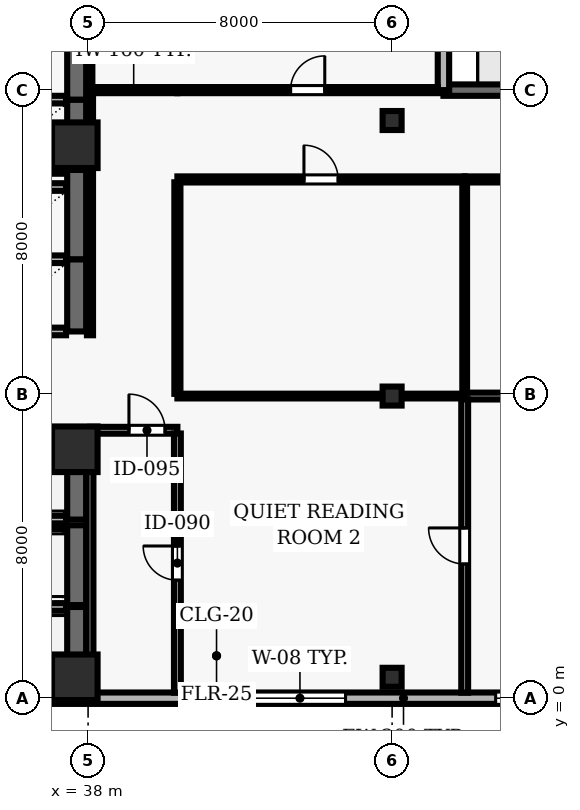
"""IFC4 building model, lengths in metres.
Left out: names, types, materials, properties, quantities, classifications, styles, units other than length and angle.
Written with IfcOpenShell. Run it as: python <this file> out.ifc"""

import sys

from ifc_helpers import new_model, si_unit, direction, frame, frame_2d, origin, origin_2d, place, context, subcontext, project, spatial, rectangle, hollow_rectangle, extrude, element, fill, save


model = new_model("IFC4")
c1 = context("Model", 3, precision=1e-05, world=origin(), true_north=direction((0.0, 1.0)))
c2 = subcontext(c1, "Body", "Model", "MODEL_VIEW")
j1 = project(units=[si_unit("LENGTHUNIT", "METRE"), si_unit("PLANEANGLEUNIT", "RADIAN")], contexts=[c1])
p1 = place(None, origin())
s1 = spatial("IfcSite", under=j1, at=p1, CompositionType="ELEMENT")
p2 = place(p1, origin())
s2 = spatial("IfcBuilding", under=s1, at=p2, CompositionType="ELEMENT")
p3 = place(p2, frame((0.0, 0.0, 130.7)))
s3 = spatial("IfcBuildingStorey", under=s2, at=p3, CompositionType="ELEMENT", Elevation=130.7)
for number, where, z_axis, x_axis in (
    (1, (37.65, 0.55, 0.0), (0.0, 0.0, 1.0), (1.0, 0.0, 0.0)),
    (2, (37.65, 6.55, 0.0), (0.0, 0.0, 1.0), (1.0, 0.0, 0.0)),
    (3, (37.65, 14.55, 0.0), (0.0, 0.0, 1.0), (1.0, 0.0, 0.0)),
):
    element("IfcColumn", number, at=place(p3, frame(where, z_axis=z_axis, x_axis=x_axis)), inside=s3, PredefinedType="COLUMN", context=c2, shape_type="SweptSolid", body=[
        extrude(rectangle(XDim=1.2, YDim=1.2, at=origin_2d()), origin(), (0.0, 0.0, 1.0), 3.9),
    ])
for number, where, z_axis, x_axis in (
    (4, (46.0, 0.55, 0.0), (0.0, 0.0, 1.0), (1.0, 0.0, 0.0)),
    (5, (46.0, 7.95, 0.0), (0.0, 0.0, 1.0), (1.0, 0.0, 0.0)),
    (6, (46.0, 15.2, 0.0), (0.0, 0.0, 1.0), (1.0, 0.0, 0.0)),
):
    element("IfcColumn", number, at=place(p3, frame(where, z_axis=z_axis, x_axis=x_axis)), inside=s3, PredefinedType="COLUMN", context=c2, shape_type="SweptSolid", body=[
        extrude(hollow_rectangle(XDim=0.5, YDim=0.5, WallThickness=0.025, at=origin_2d()), origin(), (0.0, 0.0, 1.0), 3.9),
    ])
p4 = place(p3, frame((24.5, 0.0, 0.0), z_axis=(0.0, 0.0, 1.0), x_axis=(1.0, 0.0, 0.0)))
e7 = element("IfcWall", 7, at=p4, inside=s3, PredefinedType="SOLIDWALL", context=c2, shape_type="SweptSolid", body=[
    extrude(rectangle(XDim=43.6, YDim=0.3, at=frame_2d((21.8, 0.0))), origin(), (0.0, 0.0, 1.0), 3.69),
])
p5 = place(p4, frame((1.525, 0.0, 0.9)))
e8 = element("IfcOpeningElement", 8, at=p5, cuts=e7, PredefinedType="OPENING", context=c2, shape_type="SweptSolid", body=[
    extrude(rectangle(XDim=2.4, YDim=1.8, at=frame_2d((1.2, 0.9))), frame((0.0, 0.16, 0.0), z_axis=(0.0, -1.0, 0.0), x_axis=(1.0, 0.0, 0.0)), (0.0, 0.0, 1.0), 0.32),
])
p6 = place(p4, frame((17.875, 0.0, 0.9)))
e9 = element("IfcOpeningElement", 9, at=p6, cuts=e7, PredefinedType="OPENING", context=c2, shape_type="SweptSolid", body=[
    extrude(rectangle(XDim=2.4, YDim=1.8, at=frame_2d((1.2, 0.9))), frame((0.0, 0.16, 0.0), z_axis=(0.0, -1.0, 0.0), x_axis=(1.0, 0.0, 0.0)), (0.0, 0.0, 1.0), 0.32),
])
p7 = place(p4, frame((24.225, 0.0, 0.9)))
e10 = element("IfcOpeningElement", 10, at=p7, cuts=e7, PredefinedType="OPENING", context=c2, shape_type="SweptSolid", body=[
    extrude(rectangle(XDim=2.4, YDim=1.8, at=frame_2d((1.2, 0.9))), frame((0.0, 0.16, 0.0), z_axis=(0.0, -1.0, 0.0), x_axis=(1.0, 0.0, 0.0)), (0.0, 0.0, 1.0), 0.32),
])
p8 = place(p4, frame((28.325, 0.0, 0.9)))
e11 = element("IfcOpeningElement", 11, at=p8, cuts=e7, PredefinedType="OPENING", context=c2, shape_type="SweptSolid", body=[
    extrude(rectangle(XDim=2.4, YDim=1.8, at=frame_2d((1.2, 0.9))), frame((0.0, 0.16, 0.0), z_axis=(0.0, -1.0, 0.0), x_axis=(1.0, 0.0, 0.0)), (0.0, 0.0, 1.0), 0.32),
])
p9 = place(p4, frame((34.225, 0.0, 0.9)))
e12 = element("IfcOpeningElement", 12, at=p9, cuts=e7, PredefinedType="OPENING", context=c2, shape_type="SweptSolid", body=[
    extrude(rectangle(XDim=2.4, YDim=1.8, at=frame_2d((1.2, 0.9))), frame((0.0, 0.16, 0.0), z_axis=(0.0, -1.0, 0.0), x_axis=(1.0, 0.0, 0.0)), (0.0, 0.0, 1.0), 0.32),
])
p10 = place(p4, frame((39.675, 0.0, 0.9)))
e13 = element("IfcOpeningElement", 13, at=p10, cuts=e7, PredefinedType="OPENING", context=c2, shape_type="SweptSolid", body=[
    extrude(rectangle(XDim=2.4, YDim=1.8, at=frame_2d((1.2, 0.9))), frame((0.0, 0.16, 0.0), z_axis=(0.0, -1.0, 0.0), x_axis=(1.0, 0.0, 0.0)), (0.0, 0.0, 1.0), 0.32),
])
p11 = place(p3, frame((68.1, 16.0, 0.0), z_axis=(0.0, 0.0, 1.0), x_axis=(-1.0, 0.0, 0.0)))
e14 = element("IfcWall", 14, at=p11, inside=s3, PredefinedType="SOLIDWALL", context=c2, shape_type="SweptSolid", body=[
    extrude(rectangle(XDim=20.749, YDim=0.3, at=frame_2d((10.375, 0.0))), origin(), (0.0, 0.0, 1.0), 3.69),
])
p12 = place(p11, frame((11.974, 0.0, 0.0)))
e15 = element("IfcOpeningElement", 15, at=p12, cuts=e14, PredefinedType="OPENING", context=c2, shape_type="SweptSolid", body=[
    extrude(rectangle(XDim=1.0, YDim=2.2, at=frame_2d((0.5, 1.1))), frame((0.0, 0.16, 0.0), z_axis=(0.0, -1.0, 0.0), x_axis=(1.0, 0.0, 0.0)), (0.0, 0.0, 1.0), 0.32),
])
p13 = place(p11, frame((1.958, 0.0, 0.9)))
e16 = element("IfcOpeningElement", 16, at=p13, cuts=e14, PredefinedType="OPENING", context=c2, shape_type="SweptSolid", body=[
    extrude(rectangle(XDim=3.0, YDim=2.2, at=frame_2d((1.5, 1.1))), frame((0.0, 0.16, 0.0), z_axis=(0.0, -1.0, 0.0), x_axis=(1.0, 0.0, 0.0)), (0.0, 0.0, 1.0), 0.32),
])
p14 = place(p11, frame((8.424, 0.0, 0.9)))
e17 = element("IfcOpeningElement", 17, at=p14, cuts=e14, PredefinedType="OPENING", context=c2, shape_type="SweptSolid", body=[
    extrude(rectangle(XDim=3.0, YDim=2.2, at=frame_2d((1.5, 1.1))), frame((0.0, 0.16, 0.0), z_axis=(0.0, -1.0, 0.0), x_axis=(1.0, 0.0, 0.0)), (0.0, 0.0, 1.0), 0.32),
])
p15 = place(p11, frame((15.791, 0.0, 0.9)))
e18 = element("IfcOpeningElement", 18, at=p15, cuts=e14, PredefinedType="OPENING", context=c2, shape_type="SweptSolid", body=[
    extrude(rectangle(XDim=3.0, YDim=2.2, at=frame_2d((1.5, 1.1))), frame((0.0, 0.16, 0.0), z_axis=(0.0, -1.0, 0.0), x_axis=(1.0, 0.0, 0.0)), (0.0, 0.0, 1.0), 0.32),
])
p16 = place(p3, frame((47.351, 16.0, 0.0), z_axis=(0.0, 0.0, 1.0), x_axis=(0.0, 1.0, 0.0)))
e19 = element("IfcWall", 19, at=p16, inside=s3, PredefinedType="SOLIDWALL", context=c2, shape_type="SweptSolid", body=[
    extrude(rectangle(XDim=10.7, YDim=0.3, at=frame_2d((5.35, 0.0))), origin(), (0.0, 0.0, 1.0), 3.69),
])
p17 = place(p16, frame((4.75, 0.0, 0.9)))
e20 = element("IfcOpeningElement", 20, at=p17, cuts=e19, PredefinedType="OPENING", context=c2, shape_type="SweptSolid", body=[
    extrude(rectangle(XDim=1.2, YDim=1.6, at=frame_2d((0.6, 0.8))), frame((0.0, 0.16, 0.0), z_axis=(0.0, -1.0, 0.0), x_axis=(1.0, 0.0, 0.0)), (0.0, 0.0, 1.0), 0.32),
])
p18 = place(p3, frame((37.7, 0.3, 0.0), z_axis=(0.0, 0.0, 1.0), x_axis=(0.0, 1.0, 0.0)))
e21 = element("IfcWall", 21, at=p18, inside=s3, PredefinedType="SHEAR", context=c2, shape_type="SweptSolid", body=[
    extrude(rectangle(XDim=2.1, YDim=0.5, at=frame_2d((1.05, 0.0))), origin(), (0.0, 0.0, 1.0), 3.69),
])
for number, where, z_axis, x_axis in (
    (22, (35.28, 0.3, 0.0), (0.0, 0.0, 1.0), (1.0, 0.0, 0.0)),
    (23, (37.42, 2.4, 0.0), (0.0, 0.0, 1.0), (-1.0, 0.0, 0.0)),
):
    element("IfcWall", number, at=place(p3, frame(where, z_axis=z_axis, x_axis=x_axis)), inside=s3, PredefinedType="SOLIDWALL", context=c2, shape_type="SweptSolid", body=[
        extrude(rectangle(XDim=2.14, YDim=0.2, at=frame_2d((1.07, 0.0))), origin(), (0.0, 0.0, 1.0), 3.69),
    ])
p19 = place(p3, frame((37.7, 2.45, 0.0), z_axis=(0.0, 0.0, 1.0), x_axis=(0.0, 1.0, 0.0)))
e24 = element("IfcWall", 24, at=p19, inside=s3, PredefinedType="SHEAR", context=c2, shape_type="SweptSolid", body=[
    extrude(rectangle(XDim=2.1, YDim=0.5, at=frame_2d((1.05, 0.0))), origin(), (0.0, 0.0, 1.0), 3.69),
])
p20 = place(p3, frame((37.42, 4.55, 0.0), z_axis=(0.0, 0.0, 1.0), x_axis=(-1.0, 0.0, 0.0)))
e25 = element("IfcWall", 25, at=p20, inside=s3, PredefinedType="SOLIDWALL", context=c2, shape_type="SweptSolid", body=[
    extrude(rectangle(XDim=2.14, YDim=0.2, at=frame_2d((1.07, 0.0))), origin(), (0.0, 0.0, 1.0), 3.69),
])
p21 = place(p3, frame((37.7, 4.7, 0.0), z_axis=(0.0, 0.0, 1.0), x_axis=(0.0, 1.0, 0.0)))
e26 = element("IfcWall", 26, at=p21, inside=s3, PredefinedType="SHEAR", context=c2, shape_type="SweptSolid", body=[
    extrude(rectangle(XDim=2.25, YDim=0.5, at=frame_2d((1.125, 0.0))), origin(), (0.0, 0.0, 1.0), 3.69),
])
for number, where, z_axis, x_axis in (
    (27, (35.28, 4.7, 0.0), (0.0, 0.0, 1.0), (1.0, 0.0, 0.0)),
    (28, (37.42, 6.95, 0.0), (0.0, 0.0, 1.0), (-1.0, 0.0, 0.0)),
):
    element("IfcWall", number, at=place(p3, frame(where, z_axis=z_axis, x_axis=x_axis)), inside=s3, PredefinedType="SOLIDWALL", context=c2, shape_type="SweptSolid", body=[
        extrude(rectangle(XDim=2.14, YDim=0.2, at=frame_2d((1.07, 0.0))), origin(), (0.0, 0.0, 1.0), 3.69),
    ])
p22 = place(p3, frame((37.7, 9.65, 0.0), z_axis=(0.0, 0.0, 1.0), x_axis=(0.0, 1.0, 0.0)))
e29 = element("IfcWall", 29, at=p22, inside=s3, PredefinedType="SHEAR", context=c2, shape_type="SweptSolid", body=[
    extrude(rectangle(XDim=1.9, YDim=0.5, at=frame_2d((0.95, 0.0))), origin(), (0.0, 0.0, 1.0), 3.69),
])
for number, where, z_axis, x_axis in (
    (30, (35.28, 9.65, 0.0), (0.0, 0.0, 1.0), (1.0, 0.0, 0.0)),
    (31, (37.42, 11.55, 0.0), (0.0, 0.0, 1.0), (-1.0, 0.0, 0.0)),
):
    element("IfcWall", number, at=place(p3, frame(where, z_axis=z_axis, x_axis=x_axis)), inside=s3, PredefinedType="SOLIDWALL", context=c2, shape_type="SweptSolid", body=[
        extrude(rectangle(XDim=2.14, YDim=0.2, at=frame_2d((1.07, 0.0))), origin(), (0.0, 0.0, 1.0), 3.69),
    ])
p23 = place(p3, frame((37.7, 11.55, 0.0), z_axis=(0.0, 0.0, 1.0), x_axis=(0.0, 1.0, 0.0)))
e32 = element("IfcWall", 32, at=p23, inside=s3, PredefinedType="SHEAR", context=c2, shape_type="SweptSolid", body=[
    extrude(rectangle(XDim=2.35, YDim=0.5, at=frame_2d((1.175, 0.0))), origin(), (0.0, 0.0, 1.0), 3.69),
])
p24 = place(p3, frame((37.42, 13.45, 0.0), z_axis=(0.0, 0.0, 1.0), x_axis=(-1.0, 0.0, 0.0)))
e33 = element("IfcWall", 33, at=p24, inside=s3, PredefinedType="SOLIDWALL", context=c2, shape_type="SweptSolid", body=[
    extrude(rectangle(XDim=2.14, YDim=0.2, at=frame_2d((1.07, 0.0))), origin(), (0.0, 0.0, 1.0), 3.69),
])
p25 = place(p3, frame((37.7, 13.9, 0.0), z_axis=(0.0, 0.0, 1.0), x_axis=(0.0, 1.0, 0.0)))
e34 = element("IfcWall", 34, at=p25, inside=s3, PredefinedType="SHEAR", context=c2, shape_type="SweptSolid", body=[
    extrude(rectangle(XDim=1.85, YDim=0.5, at=frame_2d((0.925, 0.0))), origin(), (0.0, 0.0, 1.0), 3.69),
])
for number, where, z_axis, x_axis in (
    (35, (35.28, 13.9, 0.0), (0.0, 0.0, 1.0), (1.0, 0.0, 0.0)),
    (36, (37.42, 15.75, 0.0), (0.0, 0.0, 1.0), (-1.0, 0.0, 0.0)),
):
    element("IfcWall", number, at=place(p3, frame(where, z_axis=z_axis, x_axis=x_axis)), inside=s3, PredefinedType="SOLIDWALL", context=c2, shape_type="SweptSolid", body=[
        extrude(rectangle(XDim=2.14, YDim=0.2, at=frame_2d((1.07, 0.0))), origin(), (0.0, 0.0, 1.0), 3.69),
    ])
p26 = place(p3, frame((37.7, 15.75, 0.0), z_axis=(0.0, 0.0, 1.0), x_axis=(0.0, 1.0, 0.0)))
e37 = element("IfcWall", 37, at=p26, inside=s3, PredefinedType="SHEAR", context=c2, shape_type="SweptSolid", body=[
    extrude(rectangle(XDim=1.85, YDim=0.5, at=frame_2d((0.925, 0.0))), origin(), (0.0, 0.0, 1.0), 3.69),
])
p27 = place(p3, frame((38.05, 7.05, 0.0), z_axis=(0.0, 0.0, 1.0), x_axis=(1.0, 0.0, 0.0)))
e38 = element("IfcWall", 38, at=p27, inside=s3, PredefinedType="PARTITIONING", context=c2, shape_type="SweptSolid", body=[
    extrude(rectangle(XDim=2.3, YDim=0.18, at=frame_2d((1.15, 0.0))), origin(), (0.0, 0.0, 1.0), 3.69),
])
p28 = place(p27, frame((1.025, 0.0, 0.0)))
e39 = element("IfcOpeningElement", 39, at=p28, cuts=e38, PredefinedType="OPENING", context=c2, shape_type="SweptSolid", body=[
    extrude(rectangle(XDim=0.95, YDim=2.1, at=frame_2d((0.475, 1.05))), frame((0.0, 0.1, 0.0), z_axis=(0.0, -1.0, 0.0), x_axis=(1.0, 0.0, 0.0)), (0.0, 0.0, 1.0), 0.2),
])
p29 = place(p3, frame((40.35, 13.65, 0.0), z_axis=(0.0, 0.0, 1.0), x_axis=(1.0, 0.0, 0.0)))
e40 = element("IfcWall", 40, at=p29, inside=s3, PredefinedType="PARTITIONING", context=c2, shape_type="SweptSolid", body=[
    extrude(rectangle(XDim=7.56, YDim=0.16, at=frame_2d((3.78, 0.0))), origin(), (0.0, 0.0, 1.0), 3.69),
])
p30 = place(p29, frame((3.33, 0.0, 0.0)))
e41 = element("IfcOpeningElement", 41, at=p30, cuts=e40, PredefinedType="OPENING", context=c2, shape_type="SweptSolid", body=[
    extrude(rectangle(XDim=0.9, YDim=2.1, at=frame_2d((0.45, 1.05))), frame((0.0, 0.09, 0.0), z_axis=(0.0, -1.0, 0.0), x_axis=(1.0, 0.0, 0.0)), (0.0, 0.0, 1.0), 0.18),
])
p31 = place(p3, frame((40.35, 16.0, 0.0), z_axis=(0.0, 0.0, 1.0), x_axis=(-1.0, 0.0, 0.0)))
e42 = element("IfcWall", 42, at=p31, inside=s3, PredefinedType="PARTITIONING", context=c2, shape_type="SweptSolid", body=[
    extrude(rectangle(XDim=2.3, YDim=0.16, at=frame_2d((1.15, 0.0))), origin(), (0.0, 0.0, 1.0), 3.69),
])
p32 = place(p3, frame((40.35, 16.0, 0.0), z_axis=(0.0, 0.0, 1.0), x_axis=(1.0, 0.0, 0.0)))
e43 = element("IfcWall", 43, at=p32, inside=s3, PredefinedType="PARTITIONING", context=c2, shape_type="SweptSolid", body=[
    extrude(rectangle(XDim=6.856, YDim=0.16, at=frame_2d((3.428, 0.0))), origin(), (0.0, 0.0, 1.0), 3.39),
])
p33 = place(p32, frame((2.978, 0.0, 0.0)))
e44 = element("IfcOpeningElement", 44, at=p33, cuts=e43, PredefinedType="OPENING", context=c2, shape_type="SweptSolid", body=[
    extrude(rectangle(XDim=0.9, YDim=2.1, at=frame_2d((0.45, 1.05))), frame((0.0, 0.09, 0.0), z_axis=(0.0, -1.0, 0.0), x_axis=(1.0, 0.0, 0.0)), (0.0, 0.0, 1.0), 0.18),
])
p34 = place(p3, frame((47.91, 7.95, 0.0), z_axis=(0.0, 0.0, 1.0), x_axis=(-1.0, 0.0, 0.0)))
e45 = element("IfcWall", 45, at=p34, inside=s3, PredefinedType="PARTITIONING", context=c2, shape_type="SweptSolid", body=[
    extrude(rectangle(XDim=7.56, YDim=0.125, at=frame_2d((3.78, 0.0))), origin(), (0.0, 0.0, 1.0), 3.073),
])
p35 = place(p3, frame((47.91, 13.65, 0.0), z_axis=(0.0, 0.0, 1.0), x_axis=(1.0, 0.0, 0.0)))
e46 = element("IfcWall", 46, at=p35, inside=s3, PredefinedType="PARTITIONING", context=c2, shape_type="SweptSolid", body=[
    extrude(rectangle(XDim=8.17, YDim=0.16, at=frame_2d((4.085, 0.0))), origin(), (0.0, 0.0, 1.0), 3.69),
])
p36 = place(p35, frame((5.035, 0.0, 0.0)))
e47 = element("IfcOpeningElement", 47, at=p36, cuts=e46, PredefinedType="OPENING", context=c2, shape_type="SweptSolid", body=[
    extrude(rectangle(XDim=0.9, YDim=2.1, at=frame_2d((0.45, 1.05))), frame((0.0, 0.09, 0.0), z_axis=(0.0, -1.0, 0.0), x_axis=(1.0, 0.0, 0.0)), (0.0, 0.0, 1.0), 0.18),
])
p37 = place(p3, frame((56.08, 7.95, 0.0), z_axis=(0.0, 0.0, 1.0), x_axis=(-1.0, 0.0, 0.0)))
e48 = element("IfcWall", 48, at=p37, inside=s3, PredefinedType="PARTITIONING", context=c2, shape_type="SweptSolid", body=[
    extrude(rectangle(XDim=8.17, YDim=0.18, at=frame_2d((4.085, 0.0))), origin(), (0.0, 0.0, 1.0), 3.073),
])
p38 = place(p3, frame((38.05, 6.965, 0.0), z_axis=(0.0, 0.0, 1.0), x_axis=(0.0, -1.0, 0.0)))
e49 = element("IfcWall", 49, at=p38, inside=s3, PredefinedType="PARTITIONING", context=c2, shape_type="SweptSolid", body=[
    extrude(rectangle(XDim=6.82, YDim=0.18, at=frame_2d((3.41, 0.0))), origin(), (0.0, 0.0, 1.0), 3.073),
])
p39 = place(p3, frame((38.05, 15.925, 0.0), z_axis=(0.0, 0.0, 1.0), x_axis=(0.0, -1.0, 0.0)))
e50 = element("IfcWall", 50, at=p39, inside=s3, PredefinedType="PARTITIONING", context=c2, shape_type="SweptSolid", body=[
    extrude(rectangle(XDim=6.375, YDim=0.16, at=frame_2d((3.188, 0.0))), origin(), (0.0, 0.0, 1.0), 3.073),
])
p40 = place(p3, frame((38.05, 23.85, 0.0), z_axis=(0.0, 0.0, 1.0), x_axis=(0.0, -1.0, 0.0)))
e51 = element("IfcWall", 51, at=p40, inside=s3, PredefinedType="PARTITIONING", context=c2, shape_type="SweptSolid", body=[
    extrude(rectangle(XDim=7.775, YDim=0.125, at=frame_2d((3.888, 0.0))), origin(), (0.0, 0.0, 1.0), 3.073),
])
p41 = place(p3, frame((40.35, 0.145, 0.0), z_axis=(0.0, 0.0, 1.0), x_axis=(0.0, 1.0, 0.0)))
e52 = element("IfcWall", 52, at=p41, inside=s3, PredefinedType="PARTITIONING", context=c2, shape_type="SweptSolid", body=[
    extrude(rectangle(XDim=6.82, YDim=0.18, at=frame_2d((3.41, 0.0))), origin(), (0.0, 0.0, 1.0), 3.69),
])
p42 = place(p41, frame((2.96, 0.0, 0.0)))
e53 = element("IfcOpeningElement", 53, at=p42, cuts=e52, PredefinedType="OPENING", context=c2, shape_type="SweptSolid", body=[
    extrude(rectangle(XDim=0.9, YDim=2.1, at=frame_2d((0.45, 1.05))), frame((0.0, 0.1, 0.0), z_axis=(0.0, -1.0, 0.0), x_axis=(1.0, 0.0, 0.0)), (0.0, 0.0, 1.0), 0.2),
])
p43 = place(p3, frame((40.35, 8.008, 0.0), z_axis=(0.0, 0.0, 1.0), x_axis=(0.0, 1.0, 0.0)))
e54 = element("IfcWall", 54, at=p43, inside=s3, PredefinedType="PARTITIONING", context=c2, shape_type="SweptSolid", body=[
    extrude(rectangle(XDim=5.567, YDim=0.16, at=frame_2d((2.783, 0.0))), origin(), (0.0, 0.0, 1.0), 3.69),
])
p44 = place(p3, frame((47.91, 0.145, 0.0), z_axis=(0.0, 0.0, 1.0), x_axis=(0.0, 1.0, 0.0)))
e55 = element("IfcWall", 55, at=p44, inside=s3, PredefinedType="PARTITIONING", context=c2, shape_type="SweptSolid", body=[
    extrude(rectangle(XDim=7.72, YDim=0.18, at=frame_2d((3.86, 0.0))), origin(), (0.0, 0.0, 1.0), 3.69),
])
p45 = place(p44, frame((3.385, 0.0, 0.0)))
e56 = element("IfcOpeningElement", 56, at=p45, cuts=e55, PredefinedType="OPENING", context=c2, shape_type="SweptSolid", body=[
    extrude(rectangle(XDim=0.95, YDim=2.1, at=frame_2d((0.475, 1.05))), frame((0.0, 0.1, 0.0), z_axis=(0.0, -1.0, 0.0), x_axis=(1.0, 0.0, 0.0)), (0.0, 0.0, 1.0), 0.2),
])
p46 = place(p3, frame((47.91, 8.035, 0.0), z_axis=(0.0, 0.0, 1.0), x_axis=(0.0, 1.0, 0.0)))
e57 = element("IfcWall", 57, at=p46, inside=s3, PredefinedType="PARTITIONING", context=c2, shape_type="SweptSolid", body=[
    extrude(rectangle(XDim=5.54, YDim=0.125, at=frame_2d((2.77, 0.0))), origin(), (0.0, 0.0, 1.0), 3.69),
])
p47 = place(p6, origin())
e58 = element("IfcWindow", 58, at=p47, inside=s3, PartitioningType="SINGLE_PANEL", PredefinedType="WINDOW", context=c2, shape_type="SweptSolid", body=[
    extrude(rectangle(XDim=2.4, YDim=1.8, at=frame_2d((1.2, 0.9))), frame((0.0, 0.03, 0.0), z_axis=(0.0, -1.0, 0.0), x_axis=(1.0, 0.0, 0.0)), (0.0, 0.0, 1.0), 0.06),
])
fill(e9, e58)
p48 = place(p7, origin())
e59 = element("IfcWindow", 59, at=p48, inside=s3, PartitioningType="SINGLE_PANEL", PredefinedType="WINDOW", context=c2, shape_type="SweptSolid", body=[
    extrude(rectangle(XDim=2.4, YDim=1.8, at=frame_2d((1.2, 0.9))), frame((0.0, 0.03, 0.0), z_axis=(0.0, -1.0, 0.0), x_axis=(1.0, 0.0, 0.0)), (0.0, 0.0, 1.0), 0.06),
])
fill(e10, e59)
p49 = place(p28, origin())
e60 = element("IfcDoor", 60, at=p49, inside=s3, OperationType="SINGLE_SWING_LEFT", PredefinedType="DOOR", context=c2, shape_type="SweptSolid", body=[
    extrude(rectangle(XDim=0.95, YDim=2.1, at=frame_2d((0.475, 1.05))), frame((0.0, 0.025, 0.0), z_axis=(0.0, -1.0, 0.0), x_axis=(1.0, 0.0, 0.0)), (0.0, 0.0, 1.0), 0.05),
])
fill(e39, e60)
p50 = place(p42, origin())
e61 = element("IfcDoor", 61, at=p50, inside=s3, OperationType="SINGLE_SWING_RIGHT", PredefinedType="DOOR", context=c2, shape_type="SweptSolid", body=[
    extrude(rectangle(XDim=0.9, YDim=2.1, at=frame_2d((0.45, 1.05))), frame((0.0, 0.025, 0.0), z_axis=(0.0, -1.0, 0.0), x_axis=(1.0, 0.0, 0.0)), (0.0, 0.0, 1.0), 0.05),
])
fill(e53, e61)
p51 = place(p30, origin())
e62 = element("IfcDoor", 62, at=p51, inside=s3, OperationType="SINGLE_SWING_LEFT", PredefinedType="DOOR", context=c2, shape_type="SweptSolid", body=[
    extrude(rectangle(XDim=0.9, YDim=2.1, at=frame_2d((0.45, 1.05))), frame((0.0, 0.025, 0.0), z_axis=(0.0, -1.0, 0.0), x_axis=(1.0, 0.0, 0.0)), (0.0, 0.0, 1.0), 0.05),
])
fill(e41, e62)
p52 = place(p45, origin())
e63 = element("IfcDoor", 63, at=p52, inside=s3, OperationType="SINGLE_SWING_RIGHT", PredefinedType="DOOR", context=c2, shape_type="SweptSolid", body=[
    extrude(rectangle(XDim=0.95, YDim=2.1, at=frame_2d((0.475, 1.05))), frame((0.0, 0.025, 0.0), z_axis=(0.0, -1.0, 0.0), x_axis=(1.0, 0.0, 0.0)), (0.0, 0.0, 1.0), 0.05),
])
fill(e56, e63)
p53 = place(p33, origin())
e64 = element("IfcDoor", 64, at=p53, inside=s3, OperationType="SINGLE_SWING_RIGHT", PredefinedType="DOOR", context=c2, shape_type="SweptSolid", body=[
    extrude(rectangle(XDim=0.9, YDim=2.1, at=frame_2d((0.45, 1.05))), frame((0.0, 0.025, 0.0), z_axis=(0.0, -1.0, 0.0), x_axis=(1.0, 0.0, 0.0)), (0.0, 0.0, 1.0), 0.05),
])
fill(e44, e64)
save(model, sys.argv[1])
